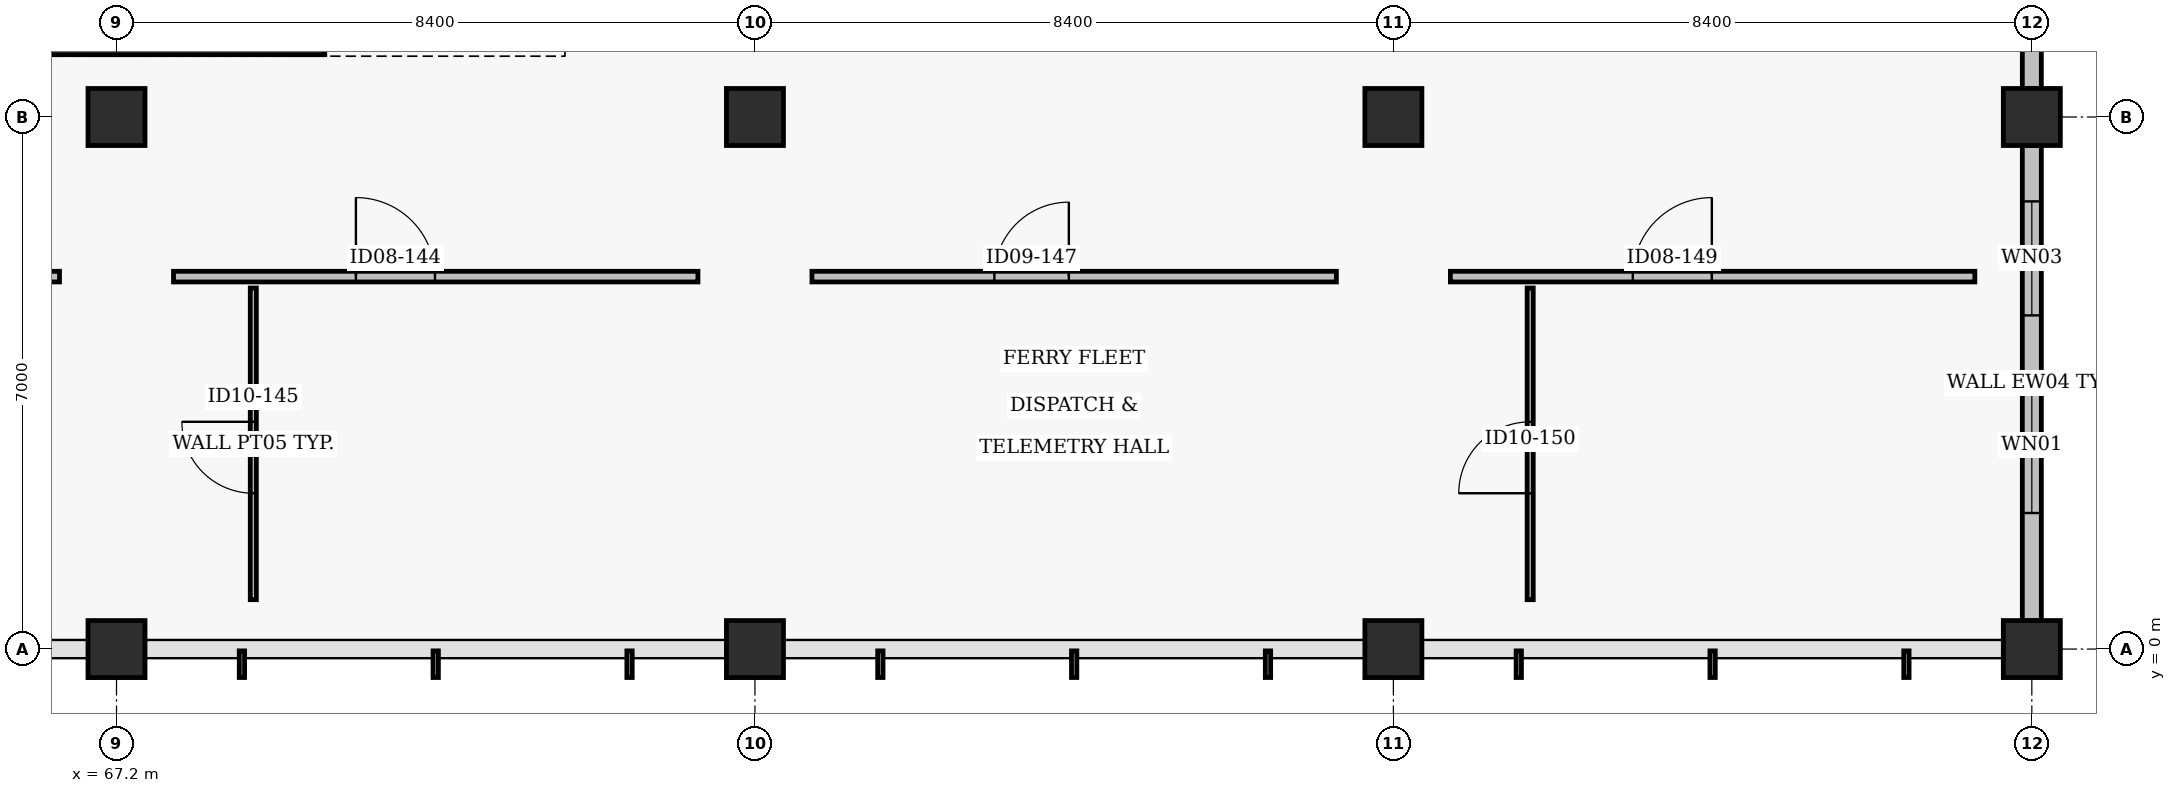
"""IFC4 building model, lengths in metres.
Left out: names, types, materials, properties, quantities, classifications, styles, units other than length and angle.
Written with IfcOpenShell. Run it as: python <this file> out.ifc"""

import sys

from ifc_helpers import new_model, si_unit, direction, frame, frame_2d, origin, origin_2d, place, context, subcontext, project, spatial, rectangle, extrude, element, fill, save


model = new_model("IFC4")
c1 = context("Model", 3, precision=1e-05, world=origin(), true_north=direction((0.0, 1.0)))
c2 = subcontext(c1, "Body", "Model", "MODEL_VIEW")
j1 = project(units=[si_unit("LENGTHUNIT", "METRE"), si_unit("PLANEANGLEUNIT", "RADIAN")], contexts=[c1])
p1 = place(None, origin())
s1 = spatial("IfcSite", under=j1, at=p1, CompositionType="ELEMENT")
p2 = place(p1, origin())
s2 = spatial("IfcBuilding", under=s1, at=p2, CompositionType="ELEMENT")
p3 = place(p2, frame((0.0, 0.0, 9.6)))
s3 = spatial("IfcBuildingStorey", under=s2, at=p3, CompositionType="ELEMENT", Elevation=9.6)
for number, where, z_axis, x_axis in (
    (1, (67.2, 0.0, 0.0), (0.0, 0.0, 1.0), (1.0, 0.0, 0.0)),
    (2, (67.2, 7.0, 0.0), (0.0, 0.0, 1.0), (1.0, 0.0, 0.0)),
    (3, (75.6, 0.0, 0.0), (0.0, 0.0, 1.0), (1.0, 0.0, 0.0)),
    (4, (75.6, 7.0, 0.0), (0.0, 0.0, 1.0), (1.0, 0.0, 0.0)),
    (5, (84.0, 0.0, 0.0), (0.0, 0.0, 1.0), (1.0, 0.0, 0.0)),
    (6, (84.0, 7.0, 0.0), (0.0, 0.0, 1.0), (1.0, 0.0, 0.0)),
    (7, (92.4, 0.0, 0.0), (0.0, 0.0, 1.0), (1.0, 0.0, 0.0)),
    (8, (92.4, 7.0, 0.0), (0.0, 0.0, 1.0), (1.0, 0.0, 0.0)),
):
    element("IfcColumn", number, at=place(p3, frame(where, z_axis=z_axis, x_axis=x_axis)), inside=s3, PredefinedType="COLUMN", context=c2, shape_type="SweptSolid", body=[
        extrude(rectangle(XDim=0.75, YDim=0.75, at=origin_2d()), origin(), (0.0, 0.0, 1.0), 3.52),
    ])
p4 = place(p3, frame((92.4, 0.375, 0.0), z_axis=(0.0, 0.0, 1.0), x_axis=(0.0, 1.0, 0.0)))
e9 = element("IfcWall", 9, at=p4, inside=s3, PredefinedType="SOLIDWALL", context=c2, shape_type="SweptSolid", body=[
    extrude(rectangle(XDim=6.25, YDim=0.25, at=frame_2d((3.125, 0.0))), origin(), (0.0, 0.0, 1.0), 2.605),
])
p5 = place(p4, frame((1.415, 0.0, 0.95)))
e10 = element("IfcOpeningElement", 10, at=p5, cuts=e9, PredefinedType="OPENING", context=c2, shape_type="SweptSolid", body=[
    extrude(rectangle(XDim=1.8, YDim=1.5, at=frame_2d((0.9, 0.75))), frame((0.0, 0.135, 0.0), z_axis=(0.0, -1.0, 0.0), x_axis=(1.0, 0.0, 0.0)), (0.0, 0.0, 1.0), 0.27),
])
p6 = place(p4, frame((4.015, 0.0, 0.95)))
e11 = element("IfcOpeningElement", 11, at=p6, cuts=e9, PredefinedType="OPENING", context=c2, shape_type="SweptSolid", body=[
    extrude(rectangle(XDim=1.5, YDim=1.5, at=frame_2d((0.75, 0.75))), frame((0.0, 0.135, 0.0), z_axis=(0.0, -1.0, 0.0), x_axis=(1.0, 0.0, 0.0)), (0.0, 0.0, 1.0), 0.27),
])
p7 = place(p3, frame((92.4, 7.375, 0.0), z_axis=(0.0, 0.0, 1.0), x_axis=(0.0, 1.0, 0.0)))
e12 = element("IfcWall", 12, at=p7, inside=s3, PredefinedType="SOLIDWALL", context=c2, shape_type="SweptSolid", body=[
    extrude(rectangle(XDim=6.25, YDim=0.25, at=frame_2d((3.125, 0.0))), origin(), (0.0, 0.0, 1.0), 2.605),
])
p8 = place(p7, frame((1.415, 0.0, 0.95)))
e13 = element("IfcOpeningElement", 13, at=p8, cuts=e12, PredefinedType="OPENING", context=c2, shape_type="SweptSolid", body=[
    extrude(rectangle(XDim=1.8, YDim=1.5, at=frame_2d((0.9, 0.75))), frame((0.0, 0.135, 0.0), z_axis=(0.0, -1.0, 0.0), x_axis=(1.0, 0.0, 0.0)), (0.0, 0.0, 1.0), 0.27),
])
p9 = place(p7, frame((4.015, 0.0, 0.95)))
e14 = element("IfcOpeningElement", 14, at=p9, cuts=e12, PredefinedType="OPENING", context=c2, shape_type="SweptSolid", body=[
    extrude(rectangle(XDim=1.5, YDim=1.5, at=frame_2d((0.75, 0.75))), frame((0.0, 0.135, 0.0), z_axis=(0.0, -1.0, 0.0), x_axis=(1.0, 0.0, 0.0)), (0.0, 0.0, 1.0), 0.27),
])
p10 = place(p3, frame((61.06, 7.96, 0.0), z_axis=(0.0, 0.0, 1.0), x_axis=(1.0, 0.0, 0.0)))
e15 = element("IfcWall", 15, at=p10, inside=s3, PredefinedType="SHEAR", context=c2, shape_type="SweptSolid", body=[
    extrude(rectangle(XDim=8.88, YDim=0.28, at=frame_2d((4.44, 0.0))), origin(), (0.0, 0.0, 1.0), 3.52),
])
p11 = place(p3, frame((59.55, 4.9, 0.0), z_axis=(0.0, 0.0, 1.0), x_axis=(1.0, 0.0, 0.0)))
e16 = element("IfcWall", 16, at=p11, inside=s3, PredefinedType="PARTITIONING", context=c2, shape_type="SweptSolid", body=[
    extrude(rectangle(XDim=6.9, YDim=0.14, at=frame_2d((3.45, 0.0))), origin(), (0.0, 0.0, 1.0), 2.55),
])
p12 = place(p11, frame((2.4, 0.0, 0.0)))
e17 = element("IfcOpeningElement", 17, at=p12, cuts=e16, PredefinedType="OPENING", context=c2, shape_type="SweptSolid", body=[
    extrude(rectangle(XDim=0.98, YDim=2.12, at=frame_2d((0.49, 1.06))), frame((0.0, 0.08, 0.0), z_axis=(0.0, -1.0, 0.0), x_axis=(1.0, 0.0, 0.0)), (0.0, 0.0, 1.0), 0.16),
])
p13 = place(p3, frame((67.95, 4.9, 0.0), z_axis=(0.0, 0.0, 1.0), x_axis=(1.0, 0.0, 0.0)))
e18 = element("IfcWall", 18, at=p13, inside=s3, PredefinedType="PARTITIONING", context=c2, shape_type="SweptSolid", body=[
    extrude(rectangle(XDim=6.9, YDim=0.14, at=frame_2d((3.45, 0.0))), origin(), (0.0, 0.0, 1.0), 2.55),
])
p14 = place(p13, frame((2.4, 0.0, 0.0)))
e19 = element("IfcOpeningElement", 19, at=p14, cuts=e18, PredefinedType="OPENING", context=c2, shape_type="SweptSolid", body=[
    extrude(rectangle(XDim=1.04, YDim=2.14, at=frame_2d((0.52, 1.07))), frame((0.0, 0.08, 0.0), z_axis=(0.0, -1.0, 0.0), x_axis=(1.0, 0.0, 0.0)), (0.0, 0.0, 1.0), 0.16),
])
p15 = place(p3, frame((69.0, 0.65, 0.0), z_axis=(0.0, 0.0, 1.0), x_axis=(0.0, 1.0, 0.0)))
e20 = element("IfcWall", 20, at=p15, inside=s3, PredefinedType="PARTITIONING", context=c2, shape_type="SweptSolid", body=[
    extrude(rectangle(XDim=4.1, YDim=0.08, at=frame_2d((2.05, 0.0))), origin(), (0.0, 0.0, 1.0), 2.5),
])
p16 = place(p15, frame((1.4, 0.0, 0.0)))
e21 = element("IfcOpeningElement", 21, at=p16, cuts=e20, PredefinedType="OPENING", context=c2, shape_type="SweptSolid", body=[
    extrude(rectangle(XDim=0.94, YDim=2.08, at=frame_2d((0.47, 1.04))), frame((0.0, 0.05, 0.0), z_axis=(0.0, -1.0, 0.0), x_axis=(1.0, 0.0, 0.0)), (0.0, 0.0, 1.0), 0.1),
])
p17 = place(p3, frame((76.35, 4.9, 0.0), z_axis=(0.0, 0.0, 1.0), x_axis=(1.0, 0.0, 0.0)))
e22 = element("IfcWall", 22, at=p17, inside=s3, PredefinedType="PARTITIONING", context=c2, shape_type="SweptSolid", body=[
    extrude(rectangle(XDim=6.9, YDim=0.14, at=frame_2d((3.45, 0.0))), origin(), (0.0, 0.0, 1.0), 2.55),
])
p18 = place(p17, frame((2.4, 0.0, 0.0)))
e23 = element("IfcOpeningElement", 23, at=p18, cuts=e22, PredefinedType="OPENING", context=c2, shape_type="SweptSolid", body=[
    extrude(rectangle(XDim=0.98, YDim=2.12, at=frame_2d((0.49, 1.06))), frame((0.0, 0.08, 0.0), z_axis=(0.0, -1.0, 0.0), x_axis=(1.0, 0.0, 0.0)), (0.0, 0.0, 1.0), 0.16),
])
p19 = place(p3, frame((84.75, 4.9, 0.0), z_axis=(0.0, 0.0, 1.0), x_axis=(1.0, 0.0, 0.0)))
e24 = element("IfcWall", 24, at=p19, inside=s3, PredefinedType="PARTITIONING", context=c2, shape_type="SweptSolid", body=[
    extrude(rectangle(XDim=6.9, YDim=0.14, at=frame_2d((3.45, 0.0))), origin(), (0.0, 0.0, 1.0), 2.55),
])
p20 = place(p19, frame((2.4, 0.0, 0.0)))
e25 = element("IfcOpeningElement", 25, at=p20, cuts=e24, PredefinedType="OPENING", context=c2, shape_type="SweptSolid", body=[
    extrude(rectangle(XDim=1.04, YDim=2.14, at=frame_2d((0.52, 1.07))), frame((0.0, 0.08, 0.0), z_axis=(0.0, -1.0, 0.0), x_axis=(1.0, 0.0, 0.0)), (0.0, 0.0, 1.0), 0.16),
])
p21 = place(p3, frame((85.8, 0.65, 0.0), z_axis=(0.0, 0.0, 1.0), x_axis=(0.0, 1.0, 0.0)))
e26 = element("IfcWall", 26, at=p21, inside=s3, PredefinedType="PARTITIONING", context=c2, shape_type="SweptSolid", body=[
    extrude(rectangle(XDim=4.1, YDim=0.08, at=frame_2d((2.05, 0.0))), origin(), (0.0, 0.0, 1.0), 2.5),
])
p22 = place(p21, frame((1.4, 0.0, 0.0)))
e27 = element("IfcOpeningElement", 27, at=p22, cuts=e26, PredefinedType="OPENING", context=c2, shape_type="SweptSolid", body=[
    extrude(rectangle(XDim=0.94, YDim=2.08, at=frame_2d((0.47, 1.04))), frame((0.0, 0.05, 0.0), z_axis=(0.0, -1.0, 0.0), x_axis=(1.0, 0.0, 0.0)), (0.0, 0.0, 1.0), 0.1),
])
p23 = place(p5, origin())
e28 = element("IfcWindow", 28, at=p23, inside=s3, PartitioningType="DOUBLE_PANEL_VERTICAL", PredefinedType="WINDOW", context=c2, shape_type="SweptSolid", body=[
    extrude(rectangle(XDim=1.8, YDim=1.5, at=frame_2d((0.9, 0.75))), frame((0.0, 0.03, 0.0), z_axis=(0.0, -1.0, 0.0), x_axis=(1.0, 0.0, 0.0)), (0.0, 0.0, 1.0), 0.06),
])
fill(e10, e28)
p24 = place(p6, origin())
e29 = element("IfcWindow", 29, at=p24, inside=s3, PartitioningType="SINGLE_PANEL", PredefinedType="WINDOW", context=c2, shape_type="SweptSolid", body=[
    extrude(rectangle(XDim=1.5, YDim=1.5, at=frame_2d((0.75, 0.75))), frame((0.0, 0.03, 0.0), z_axis=(0.0, -1.0, 0.0), x_axis=(1.0, 0.0, 0.0)), (0.0, 0.0, 1.0), 0.06),
])
fill(e11, e29)
p25 = place(p14, origin())
e30 = element("IfcDoor", 30, at=p25, inside=s3, OperationType="SINGLE_SWING_LEFT", PredefinedType="DOOR", context=c2, shape_type="SweptSolid", body=[
    extrude(rectangle(XDim=1.04, YDim=2.14, at=frame_2d((0.52, 1.07))), frame((0.0, 0.025, 0.0), z_axis=(0.0, -1.0, 0.0), x_axis=(1.0, 0.0, 0.0)), (0.0, 0.0, 1.0), 0.05),
])
fill(e19, e30)
p26 = place(p16, origin())
e31 = element("IfcDoor", 31, at=p26, inside=s3, OperationType="SINGLE_SWING_RIGHT", PredefinedType="DOOR", context=c2, shape_type="SweptSolid", body=[
    extrude(rectangle(XDim=0.94, YDim=2.08, at=frame_2d((0.47, 1.04))), frame((0.0, 0.025, 0.0), z_axis=(0.0, -1.0, 0.0), x_axis=(1.0, 0.0, 0.0)), (0.0, 0.0, 1.0), 0.05),
])
fill(e21, e31)
p27 = place(p18, origin())
e32 = element("IfcDoor", 32, at=p27, inside=s3, OperationType="SINGLE_SWING_RIGHT", PredefinedType="DOOR", context=c2, shape_type="SweptSolid", body=[
    extrude(rectangle(XDim=0.98, YDim=2.12, at=frame_2d((0.49, 1.06))), frame((0.0, 0.025, 0.0), z_axis=(0.0, -1.0, 0.0), x_axis=(1.0, 0.0, 0.0)), (0.0, 0.0, 1.0), 0.05),
])
fill(e23, e32)
p28 = place(p20, origin())
e33 = element("IfcDoor", 33, at=p28, inside=s3, OperationType="SINGLE_SWING_RIGHT", PredefinedType="DOOR", context=c2, shape_type="SweptSolid", body=[
    extrude(rectangle(XDim=1.04, YDim=2.14, at=frame_2d((0.52, 1.07))), frame((0.0, 0.025, 0.0), z_axis=(0.0, -1.0, 0.0), x_axis=(1.0, 0.0, 0.0)), (0.0, 0.0, 1.0), 0.05),
])
fill(e25, e33)
p29 = place(p22, origin())
e34 = element("IfcDoor", 34, at=p29, inside=s3, OperationType="SINGLE_SWING_LEFT", PredefinedType="DOOR", context=c2, shape_type="SweptSolid", body=[
    extrude(rectangle(XDim=0.94, YDim=2.08, at=frame_2d((0.47, 1.04))), frame((0.0, 0.025, 0.0), z_axis=(0.0, -1.0, 0.0), x_axis=(1.0, 0.0, 0.0)), (0.0, 0.0, 1.0), 0.05),
])
fill(e27, e34)
save(model, sys.argv[1])
